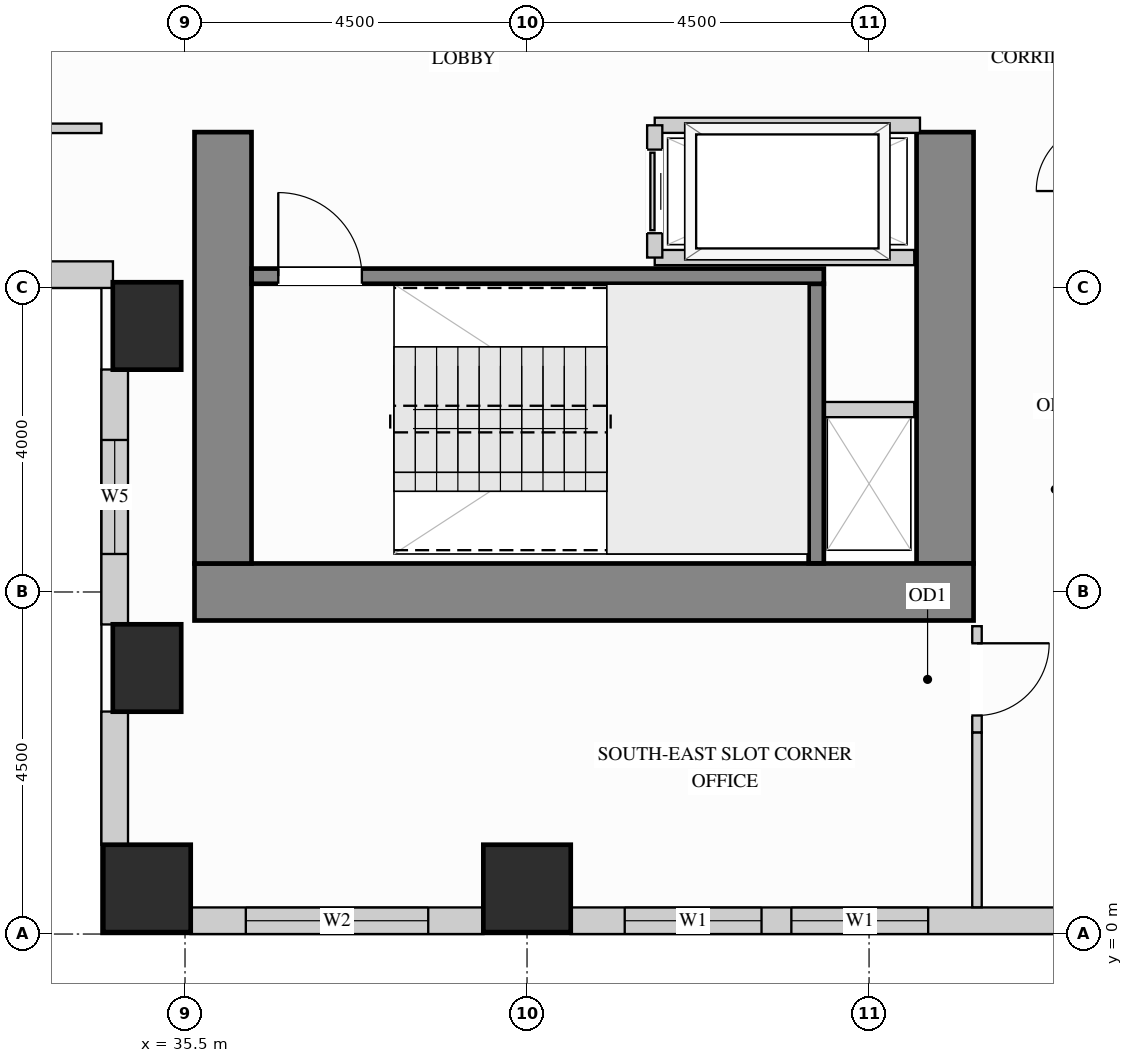
"""IFC4 building model, lengths in metres.
Left out: names, types, materials, properties, quantities, classifications, styles, units other than length and angle.
Written with IfcOpenShell. Run it as: python <this file> out.ifc"""

import sys

from ifc_helpers import new_model, si_unit, direction, frame, frame_2d, origin, origin_2d, place, context, subcontext, project, spatial, rectangle, extrude, source, transform, mapped, element, fill, save


model = new_model("IFC4")
c1 = context("Model", 3, precision=1e-05, world=origin(), true_north=direction((0.0, 1.0)))
c2 = subcontext(c1, "Body", "Model", "MODEL_VIEW")
j1 = project(units=[si_unit("LENGTHUNIT", "METRE"), si_unit("PLANEANGLEUNIT", "RADIAN")], contexts=[c1])
p1 = place(None, origin())
s1 = spatial("IfcSite", under=j1, at=p1, CompositionType="ELEMENT")
p2 = place(p1, origin())
s2 = spatial("IfcBuilding", under=s1, at=p2, CompositionType="ELEMENT")
p3 = place(p2, frame((0.0, 0.0, 124.2)))
s3 = spatial("IfcBuildingStorey", under=s2, at=p3, CompositionType="ELEMENT", Elevation=124.2)
m1 = source(origin(), c2, "Body", "SweptSolid", [
    extrude(rectangle(XDim=0.9, YDim=1.15, at=origin_2d()), origin(), (0.0, 0.0, 1.0), 3.38),
])
for number, where, z_axis, x_axis in (
    (1, (35.0, 3.5, 0.0), (0.0, 0.0, 1.0), (1.0, 0.0, 0.0)),
    (2, (35.0, 8.0, 0.0), (0.0, 0.0, 1.0), (1.0, 0.0, 0.0)),
):
    element("IfcColumn", number, at=place(p3, frame(where, z_axis=z_axis, x_axis=x_axis)), inside=s3, PredefinedType="COLUMN", context=c2, shape_type="MappedRepresentation", body=[
        mapped(m1, transform((0.0, 0.0, 0.0), x_axis=(1.0, 0.0, 0.0), y_axis=(0.0, 1.0, 0.0), z_axis=(0.0, 0.0, 1.0))),
    ])
m2 = source(origin(), c2, "Body", "SweptSolid", [
    extrude(rectangle(XDim=1.15, YDim=1.15, at=origin_2d()), origin(), (0.0, 0.0, 1.0), 3.38),
])
for number, where, z_axis, x_axis in (
    (3, (35.0, 0.6, 0.0), (0.0, 0.0, 1.0), (1.0, 0.0, 0.0)),
    (4, (40.0, 0.6, 0.0), (0.0, 0.0, 1.0), (1.0, 0.0, 0.0)),
):
    element("IfcColumn", number, at=place(p3, frame(where, z_axis=z_axis, x_axis=x_axis)), inside=s3, PredefinedType="COLUMN", context=c2, shape_type="MappedRepresentation", body=[
        mapped(m2, transform((0.0, 0.0, 0.0), x_axis=(1.0, 0.0, 0.0), y_axis=(0.0, 1.0, 0.0), z_axis=(0.0, 0.0, 1.0))),
    ])
m3 = source(origin(), c2, "Body", "SweptSolid", [
    extrude(rectangle(XDim=5.675, YDim=0.75, at=frame_2d((2.837, 0.0))), origin(), (0.0, 0.0, 1.0), 3.38),
])
p4 = place(p3, frame((45.5, 4.875, 0.0), z_axis=(0.0, 0.0, 1.0), x_axis=(0.0, 1.0, 0.0)))
e5 = element("IfcWall", 5, at=p4, inside=s3, PredefinedType="SHEAR", context=c2, shape_type="MappedRepresentation", body=[
    mapped(m3, transform((0.0, 0.0, 0.0), x_axis=(1.0, 0.0, 0.0), y_axis=(0.0, 1.0, 0.0), z_axis=(0.0, 0.0, 1.0))),
])
m4 = source(origin(), c2, "Body", "SweptSolid", [
    extrude(rectangle(XDim=10.25, YDim=0.75, at=frame_2d((5.125, 0.0))), origin(), (0.0, 0.0, 1.0), 3.38),
])
p5 = place(p3, frame((35.625, 4.5, 0.0), z_axis=(0.0, 0.0, 1.0), x_axis=(1.0, 0.0, 0.0)))
e6 = element("IfcWall", 6, at=p5, inside=s3, PredefinedType="SHEAR", context=c2, shape_type="MappedRepresentation", body=[
    mapped(m4, transform((0.0, 0.0, 0.0), x_axis=(1.0, 0.0, 0.0), y_axis=(0.0, 1.0, 0.0), z_axis=(0.0, 0.0, 1.0))),
])
p6 = place(p3, frame((36.0, 4.875, 0.0), z_axis=(0.0, 0.0, 1.0), x_axis=(0.0, 1.0, 0.0)))
e7 = element("IfcWall", 7, at=p6, inside=s3, PredefinedType="SHEAR", context=c2, shape_type="MappedRepresentation", body=[
    mapped(m3, transform((0.0, 0.0, 0.0), x_axis=(1.0, 0.0, 0.0), y_axis=(0.0, 1.0, 0.0), z_axis=(0.0, 0.0, 1.0))),
])
p7 = place(p3, frame((30.948, 8.675, 0.0), z_axis=(0.0, 0.0, 1.0), x_axis=(1.0, 0.0, 0.0)))
e8 = element("IfcWall", 8, at=p7, inside=s3, PredefinedType="SOLIDWALL", context=c2, shape_type="SweptSolid", body=[
    extrude(rectangle(XDim=3.604, YDim=0.35, at=frame_2d((1.802, 0.0))), origin(), (0.0, 0.0, 1.0), 3.365),
])
p8 = place(p7, frame((1.052, 0.0, 0.78)))
e9 = element("IfcOpeningElement", 9, at=p8, cuts=e8, PredefinedType="OPENING", context=c2, shape_type="SweptSolid", body=[
    extrude(rectangle(XDim=1.5, YDim=2.0, at=frame_2d((0.75, 1.0))), frame((0.0, 0.185, 0.0), z_axis=(0.0, -1.0, 0.0), x_axis=(1.0, 0.0, 0.0)), (0.0, 0.0, 1.0), 0.37),
])
p9 = place(p3, frame((34.575, 7.427, 0.0), z_axis=(0.0, 0.0, 1.0), x_axis=(0.0, -1.0, 0.0)))
e10 = element("IfcWall", 10, at=p9, inside=s3, PredefinedType="SOLIDWALL", context=c2, shape_type="SweptSolid", body=[
    extrude(rectangle(XDim=3.354, YDim=0.35, at=frame_2d((1.677, 0.0))), origin(), (0.0, 0.0, 1.0), 3.365),
])
p10 = place(p9, frame((0.927, 0.0, 0.78)))
e11 = element("IfcOpeningElement", 11, at=p10, cuts=e10, PredefinedType="OPENING", context=c2, shape_type="SweptSolid", body=[
    extrude(rectangle(XDim=1.5, YDim=2.0, at=frame_2d((0.75, 1.0))), frame((0.0, 0.185, 0.0), z_axis=(0.0, -1.0, 0.0), x_axis=(1.0, 0.0, 0.0)), (0.0, 0.0, 1.0), 0.37),
])
m5 = source(origin(), c2, "Body", "SweptSolid", [
    extrude(rectangle(XDim=1.754, YDim=0.35, at=frame_2d((0.877, 0.0))), origin(), (0.0, 0.0, 1.0), 3.365),
])
p11 = place(p3, frame((34.575, 2.927, 0.0), z_axis=(0.0, 0.0, 1.0), x_axis=(0.0, -1.0, 0.0)))
e12 = element("IfcWall", 12, at=p11, inside=s3, PredefinedType="SOLIDWALL", context=c2, shape_type="MappedRepresentation", body=[
    mapped(m5, transform((0.0, 0.0, 0.0), x_axis=(1.0, 0.0, 0.0), y_axis=(0.0, 1.0, 0.0), z_axis=(0.0, 0.0, 1.0))),
])
p12 = place(p3, frame((35.573, 0.175, 0.0), z_axis=(0.0, 0.0, 1.0), x_axis=(1.0, 0.0, 0.0)))
e13 = element("IfcWall", 13, at=p12, inside=s3, PredefinedType="SOLIDWALL", context=c2, shape_type="SweptSolid", body=[
    extrude(rectangle(XDim=3.854, YDim=0.35, at=frame_2d((1.927, 0.0))), origin(), (0.0, 0.0, 1.0), 3.365),
])
p13 = place(p12, frame((0.727, 0.0, 0.78)))
e14 = element("IfcOpeningElement", 14, at=p13, cuts=e13, PredefinedType="OPENING", context=c2, shape_type="SweptSolid", body=[
    extrude(rectangle(XDim=2.4, YDim=2.1, at=frame_2d((1.2, 1.05))), frame((0.0, 0.185, 0.0), z_axis=(0.0, -1.0, 0.0), x_axis=(1.0, 0.0, 0.0)), (0.0, 0.0, 1.0), 0.37),
])
p14 = place(p3, frame((40.573, 0.175, 0.0), z_axis=(0.0, 0.0, 1.0), x_axis=(1.0, 0.0, 0.0)))
e15 = element("IfcWall", 15, at=p14, inside=s3, PredefinedType="SOLIDWALL", context=c2, shape_type="SweptSolid", body=[
    extrude(rectangle(XDim=6.454, YDim=0.35, at=frame_2d((3.227, 0.0))), origin(), (0.0, 0.0, 1.0), 3.365),
])
p15 = place(p14, frame((0.712, 0.0, 0.78)))
e16 = element("IfcOpeningElement", 16, at=p15, cuts=e15, PredefinedType="OPENING", context=c2, shape_type="SweptSolid", body=[
    extrude(rectangle(XDim=1.8, YDim=2.1, at=frame_2d((0.9, 1.05))), frame((0.0, 0.185, 0.0), z_axis=(0.0, -1.0, 0.0), x_axis=(1.0, 0.0, 0.0)), (0.0, 0.0, 1.0), 0.37),
])
p16 = place(p14, frame((2.905, 0.0, 0.78)))
e17 = element("IfcOpeningElement", 17, at=p16, cuts=e15, PredefinedType="OPENING", context=c2, shape_type="SweptSolid", body=[
    extrude(rectangle(XDim=1.8, YDim=2.1, at=frame_2d((0.9, 1.05))), frame((0.0, 0.185, 0.0), z_axis=(0.0, -1.0, 0.0), x_axis=(1.0, 0.0, 0.0)), (0.0, 0.0, 1.0), 0.37),
])
p17 = place(p3, frame((45.92, 2.65, 0.0), z_axis=(0.0, 0.0, 1.0), x_axis=(0.0, 1.0, 0.0)))
e18 = element("IfcWall", 18, at=p17, inside=s3, PredefinedType="PARTITIONING", context=c2, shape_type="SweptSolid", body=[
    extrude(rectangle(XDim=1.4, YDim=0.125, at=frame_2d((0.7, 0.0))), origin(), (0.0, 0.0, 1.0), 3.365),
])
p18 = place(p17, frame((0.225, 0.0, 0.0)))
e19 = element("IfcOpeningElement", 19, at=p18, cuts=e18, PredefinedType="OPENING", context=c2, shape_type="SweptSolid", body=[
    extrude(rectangle(XDim=0.95, YDim=2.15, at=frame_2d((0.475, 1.075))), frame((0.0, 0.073, 0.0), z_axis=(0.0, -1.0, 0.0), x_axis=(1.0, 0.0, 0.0)), (0.0, 0.0, 1.0), 0.145),
])
m6 = source(origin(), c2, "Body", "SweptSolid", [
    extrude(rectangle(XDim=2.298, YDim=0.125, at=frame_2d((1.149, 0.0))), origin(), (0.0, 0.0, 1.0), 3.365),
])
p19 = place(p3, frame((45.92, 0.352, 0.0), z_axis=(0.0, 0.0, 1.0), x_axis=(0.0, 1.0, 0.0)))
e20 = element("IfcWall", 20, at=p19, inside=s3, PredefinedType="PARTITIONING", context=c2, shape_type="MappedRepresentation", body=[
    mapped(m6, transform((0.0, 0.0, 0.0), x_axis=(1.0, 0.0, 0.0), y_axis=(0.0, 1.0, 0.0), z_axis=(0.0, 0.0, 1.0))),
])
p20 = place(p3, frame((26.95, 10.6, 0.0), z_axis=(0.0, 0.0, 1.0), x_axis=(1.0, 0.0, 0.0)))
e21 = element("IfcWall", 21, at=p20, inside=s3, PredefinedType="PARTITIONING", context=c2, shape_type="SweptSolid", body=[
    extrude(rectangle(XDim=7.45, YDim=0.125, at=frame_2d((3.725, 0.0))), origin(), (0.0, 0.0, 1.0), 3.365),
])
p21 = place(p20, frame((4.683, 0.0, 0.0)))
e22 = element("IfcOpeningElement", 22, at=p21, cuts=e21, PredefinedType="OPENING", context=c2, shape_type="SweptSolid", body=[
    extrude(rectangle(XDim=0.95, YDim=2.15, at=frame_2d((0.475, 1.075))), frame((0.0, 0.073, 0.0), z_axis=(0.0, -1.0, 0.0), x_axis=(1.0, 0.0, 0.0)), (0.0, 0.0, 1.0), 0.145),
])
m7 = source(origin(), c2, "Body", "SweptSolid", [
    extrude(rectangle(XDim=1.245, YDim=0.2, at=frame_2d((0.623, 0.0))), origin(), (0.0, 0.0, 1.0), 3.365),
])
p22 = place(p3, frame((43.85, 6.9, 0.0), z_axis=(0.0, 0.0, 1.0), x_axis=(1.0, 0.0, 0.0)))
e23 = element("IfcWall", 23, at=p22, inside=s3, PredefinedType="PARTITIONING", context=c2, shape_type="MappedRepresentation", body=[
    mapped(m7, transform((0.0, 0.0, 0.0), x_axis=(1.0, 0.0, 0.0), y_axis=(0.0, 1.0, 0.0), z_axis=(0.0, 0.0, 1.0))),
])
m8 = source(origin(), c2, "Body", "SweptSolid", [
    extrude(rectangle(XDim=3.49, YDim=0.2, at=frame_2d((1.745, 0.0))), origin(), (0.0, 0.0, 1.0), 3.365),
])
p23 = place(p3, frame((41.68, 10.64, 0.0), z_axis=(0.0, 0.0, 1.0), x_axis=(1.0, 0.0, 0.0)))
e24 = element("IfcWall", 24, at=p23, inside=s3, PredefinedType="PARTITIONING", context=c2, shape_type="MappedRepresentation", body=[
    mapped(m8, transform((0.0, 0.0, 0.0), x_axis=(1.0, 0.0, 0.0), y_axis=(0.0, 1.0, 0.0), z_axis=(0.0, 0.0, 1.0))),
])
m9 = source(origin(), c2, "Body", "SweptSolid", [
    extrude(rectangle(XDim=3.415, YDim=0.2, at=frame_2d((1.708, 0.0))), origin(), (0.0, 0.0, 1.0), 3.365),
])
p24 = place(p3, frame((41.68, 8.9, 0.0), z_axis=(0.0, 0.0, 1.0), x_axis=(1.0, 0.0, 0.0)))
e25 = element("IfcWall", 25, at=p24, inside=s3, PredefinedType="PARTITIONING", context=c2, shape_type="MappedRepresentation", body=[
    mapped(m9, transform((0.0, 0.0, 0.0), x_axis=(1.0, 0.0, 0.0), y_axis=(0.0, 1.0, 0.0), z_axis=(0.0, 0.0, 1.0))),
])
p25 = place(p3, frame((41.68, 8.9, 0.0), z_axis=(0.0, 0.0, 1.0), x_axis=(0.0, 1.0, 0.0)))
e26 = element("IfcWall", 26, at=p25, inside=s3, PredefinedType="PARTITIONING", context=c2, shape_type="SweptSolid", body=[
    extrude(rectangle(XDim=1.74, YDim=0.2, at=frame_2d((0.87, 0.0))), origin(), (0.0, 0.0, 1.0), 3.365),
])
p26 = place(p25, frame((0.32, 0.0, 0.0)))
e27 = element("IfcOpeningElement", 27, at=p26, cuts=e26, PredefinedType="OPENING", context=c2, shape_type="SweptSolid", body=[
    extrude(rectangle(XDim=1.1, YDim=2.2, at=frame_2d((0.55, 1.1))), frame((0.0, 0.11, 0.0), z_axis=(0.0, -1.0, 0.0), x_axis=(1.0, 0.0, 0.0)), (0.0, 0.0, 1.0), 0.22),
])
m10 = source(origin(), c2, "Body", "SweptSolid", [
    extrude(rectangle(XDim=3.678, YDim=0.2, at=frame_2d((1.839, 0.0))), origin(), (0.0, 0.0, 1.0), 3.38),
])
p27 = place(p3, frame((43.805, 4.877, 0.0), z_axis=(0.0, 0.0, 1.0), x_axis=(0.0, 1.0, 0.0)))
e28 = element("IfcWall", 28, at=p27, inside=s3, PredefinedType="SHEAR", context=c2, shape_type="MappedRepresentation", body=[
    mapped(m10, transform((0.0, 0.0, 0.0), x_axis=(1.0, 0.0, 0.0), y_axis=(0.0, 1.0, 0.0), z_axis=(0.0, 0.0, 1.0))),
])
p28 = place(p3, frame((36.377, 8.655, 0.0), z_axis=(0.0, 0.0, 1.0), x_axis=(1.0, 0.0, 0.0)))
e29 = element("IfcWall", 29, at=p28, inside=s3, PredefinedType="SHEAR", context=c2, shape_type="SweptSolid", body=[
    extrude(rectangle(XDim=7.528, YDim=0.2, at=frame_2d((3.764, 0.0))), origin(), (0.0, 0.0, 1.0), 3.38),
])
p29 = place(p28, frame((0.35, 0.0, 0.0)))
e30 = element("IfcOpeningElement", 30, at=p29, cuts=e29, PredefinedType="OPENING", context=c2, shape_type="SweptSolid", body=[
    extrude(rectangle(XDim=1.1, YDim=2.15, at=frame_2d((0.55, 1.075))), frame((0.0, 0.11, 0.0), z_axis=(0.0, -1.0, 0.0), x_axis=(1.0, 0.0, 0.0)), (0.0, 0.0, 1.0), 0.22),
])
m11 = source(origin(), c2, "Body", "SweptSolid", [
    extrude(rectangle(XDim=1.1, YDim=2.2, at=frame_2d((0.55, 1.1))), frame((0.0, 0.025, 0.0), z_axis=(0.0, -1.0, 0.0), x_axis=(1.0, 0.0, 0.0)), (0.0, 0.0, 1.0), 0.05),
])
p30 = place(p26, origin())
e31 = element("IfcDoor", 31, at=p30, inside=s3, OperationType="SLIDING_TO_LEFT", PredefinedType="DOOR", context=c2, shape_type="MappedRepresentation", body=[
    mapped(m11, transform((0.0, 0.0, 0.0), x_axis=(1.0, 0.0, 0.0), y_axis=(0.0, 1.0, 0.0), z_axis=(0.0, 0.0, 1.0))),
])
fill(e27, e31)
m12 = source(origin(), c2, "Body", "SweptSolid", [
    extrude(rectangle(XDim=0.95, YDim=2.15, at=frame_2d((0.475, 1.075))), frame((0.0, 0.025, 0.0), z_axis=(0.0, -1.0, 0.0), x_axis=(1.0, 0.0, 0.0)), (0.0, 0.0, 1.0), 0.05),
])
p31 = place(p18, origin())
e32 = element("IfcDoor", 32, at=p31, inside=s3, OperationType="SINGLE_SWING_RIGHT", PredefinedType="DOOR", context=c2, shape_type="MappedRepresentation", body=[
    mapped(m12, transform((0.0, 0.0, 0.0), x_axis=(1.0, 0.0, 0.0), y_axis=(0.0, 1.0, 0.0), z_axis=(0.0, 0.0, 1.0))),
])
fill(e19, e32)
m13 = source(origin(), c2, "Body", "SweptSolid", [
    extrude(rectangle(XDim=1.1, YDim=2.15, at=frame_2d((0.55, 1.075))), frame((0.0, 0.025, 0.0), z_axis=(0.0, -1.0, 0.0), x_axis=(1.0, 0.0, 0.0)), (0.0, 0.0, 1.0), 0.05),
])
p32 = place(p29, origin())
e33 = element("IfcDoor", 33, at=p32, inside=s3, OperationType="SINGLE_SWING_LEFT", PredefinedType="DOOR", context=c2, shape_type="MappedRepresentation", body=[
    mapped(m13, transform((0.0, 0.0, 0.0), x_axis=(1.0, 0.0, 0.0), y_axis=(0.0, 1.0, 0.0), z_axis=(0.0, 0.0, 1.0))),
])
fill(e30, e33)
m14 = source(origin(), c2, "Body", "SweptSolid", [
    extrude(rectangle(XDim=1.8, YDim=2.1, at=frame_2d((0.9, 1.05))), frame((0.0, 0.03, 0.0), z_axis=(0.0, -1.0, 0.0), x_axis=(1.0, 0.0, 0.0)), (0.0, 0.0, 1.0), 0.06),
])
p33 = place(p15, origin())
e34 = element("IfcWindow", 34, at=p33, inside=s3, PartitioningType="SINGLE_PANEL", PredefinedType="WINDOW", context=c2, shape_type="MappedRepresentation", body=[
    mapped(m14, transform((0.0, 0.0, 0.0), x_axis=(1.0, 0.0, 0.0), y_axis=(0.0, 1.0, 0.0), z_axis=(0.0, 0.0, 1.0))),
])
fill(e16, e34)
p34 = place(p16, origin())
e35 = element("IfcWindow", 35, at=p34, inside=s3, PartitioningType="SINGLE_PANEL", PredefinedType="WINDOW", context=c2, shape_type="MappedRepresentation", body=[
    mapped(m14, transform((0.0, 0.0, 0.0), x_axis=(1.0, 0.0, 0.0), y_axis=(0.0, 1.0, 0.0), z_axis=(0.0, 0.0, 1.0))),
])
fill(e17, e35)
m15 = source(origin(), c2, "Body", "SweptSolid", [
    extrude(rectangle(XDim=2.4, YDim=2.1, at=frame_2d((1.2, 1.05))), frame((0.0, 0.03, 0.0), z_axis=(0.0, -1.0, 0.0), x_axis=(1.0, 0.0, 0.0)), (0.0, 0.0, 1.0), 0.06),
])
p35 = place(p13, origin())
e36 = element("IfcWindow", 36, at=p35, inside=s3, PartitioningType="SINGLE_PANEL", PredefinedType="WINDOW", context=c2, shape_type="MappedRepresentation", body=[
    mapped(m15, transform((0.0, 0.0, 0.0), x_axis=(1.0, 0.0, 0.0), y_axis=(0.0, 1.0, 0.0), z_axis=(0.0, 0.0, 1.0))),
])
fill(e14, e36)
m16 = source(origin(), c2, "Body", "SweptSolid", [
    extrude(rectangle(XDim=1.5, YDim=2.0, at=frame_2d((0.75, 1.0))), frame((0.0, 0.03, 0.0), z_axis=(0.0, -1.0, 0.0), x_axis=(1.0, 0.0, 0.0)), (0.0, 0.0, 1.0), 0.06),
])
p36 = place(p10, origin())
e37 = element("IfcWindow", 37, at=p36, inside=s3, PartitioningType="SINGLE_PANEL", PredefinedType="WINDOW", context=c2, shape_type="MappedRepresentation", body=[
    mapped(m16, transform((0.0, 0.0, 0.0), x_axis=(1.0, 0.0, 0.0), y_axis=(0.0, 1.0, 0.0), z_axis=(0.0, 0.0, 1.0))),
])
fill(e11, e37)
save(model, sys.argv[1])
